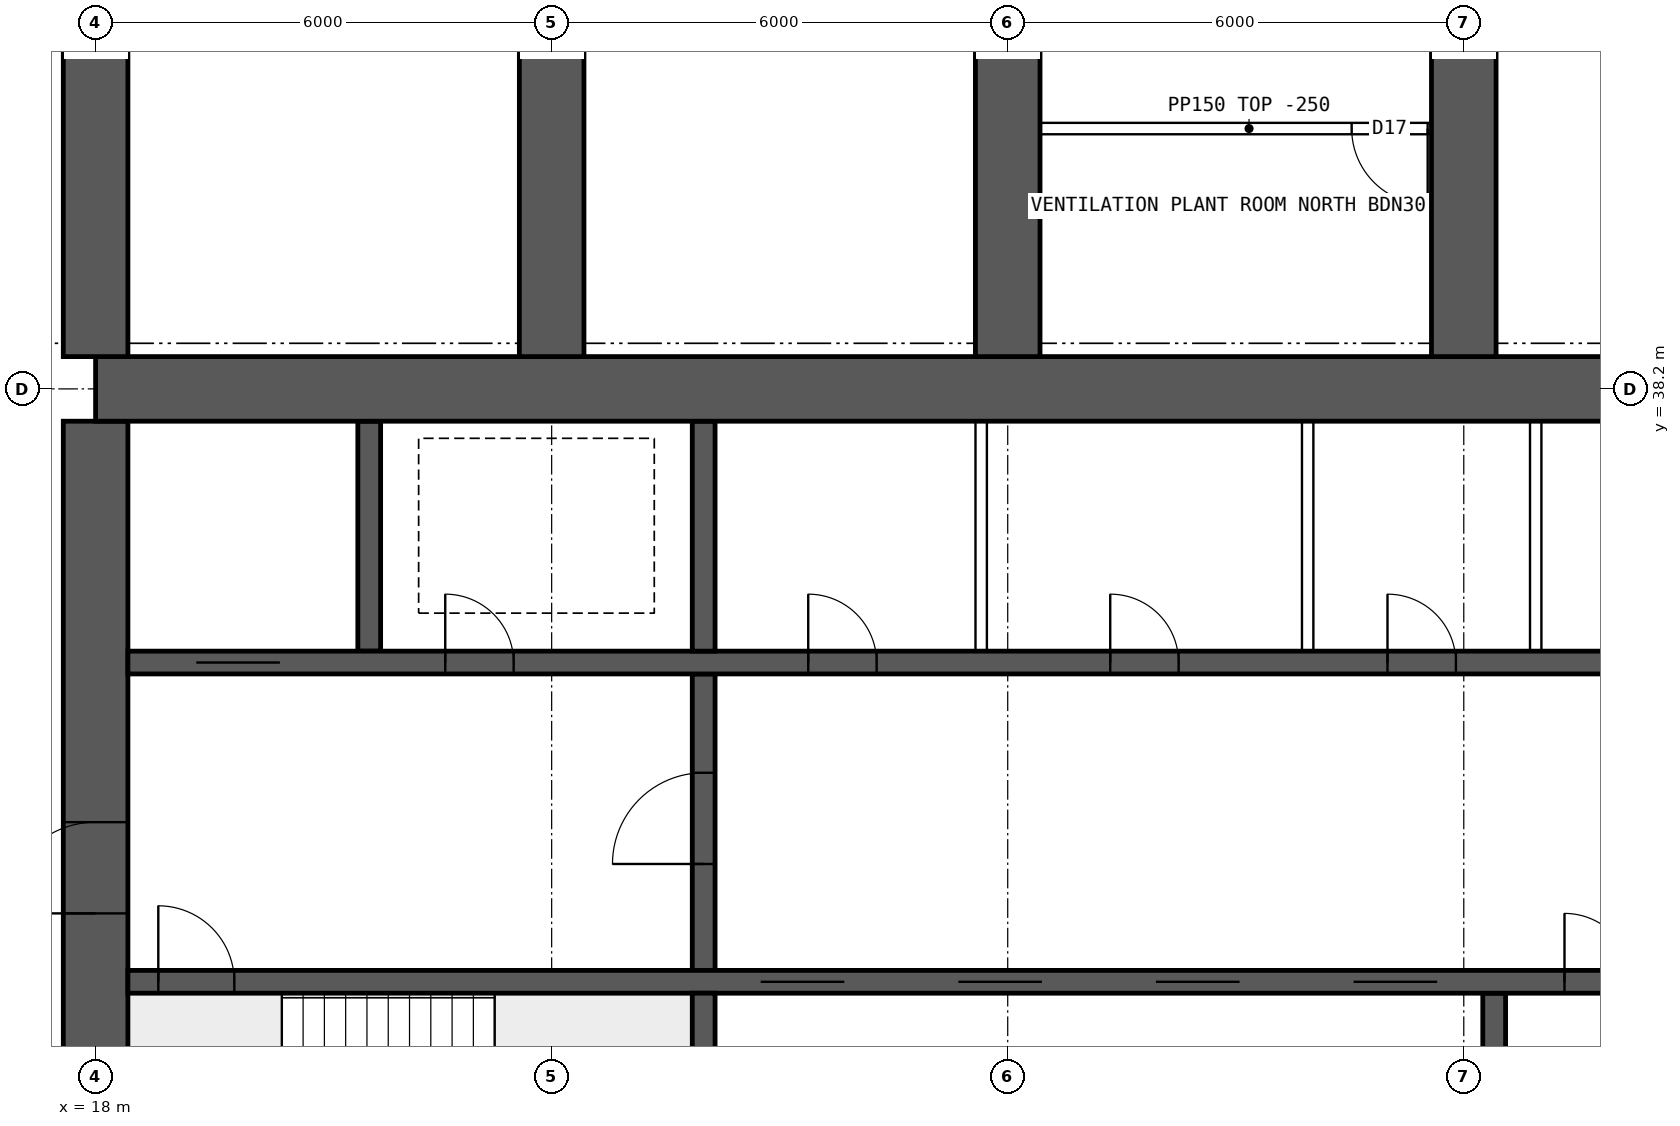
"""IFC4 building model, lengths in metres.
Left out: names, types, materials, properties, quantities, classifications, styles, units other than length and angle.
Written with IfcOpenShell. Run it as: python <this file> out.ifc"""

import sys

from ifc_helpers import new_model, si_unit, direction, frame, frame_2d, origin, place, context, subcontext, project, spatial, rectangle, extrude, element, fill, save


model = new_model("IFC4")
c1 = context("Model", 3, precision=1e-05, world=origin(), true_north=direction((0.0, 1.0)))
c2 = subcontext(c1, "Body", "Model", "MODEL_VIEW")
j1 = project(units=[si_unit("LENGTHUNIT", "METRE"), si_unit("PLANEANGLEUNIT", "RADIAN")], contexts=[c1])
p1 = place(None, origin())
s1 = spatial("IfcSite", under=j1, at=p1, CompositionType="ELEMENT")
p2 = place(p1, origin())
s2 = spatial("IfcBuilding", under=s1, at=p2, CompositionType="ELEMENT")
p3 = place(p2, frame((0.0, 0.0, 156.1)))
s3 = spatial("IfcBuildingStorey", under=s2, at=p3, CompositionType="ELEMENT", Elevation=156.1)
p4 = place(p3, frame((18.0, 38.2, 0.0), z_axis=(0.0, 0.0, 1.0), x_axis=(1.0, 0.0, 0.0)))
e1 = element("IfcWall", 1, at=p4, inside=s3, PredefinedType="SHEAR", context=c2, shape_type="SweptSolid", body=[
    extrude(rectangle(XDim=48.0, YDim=0.85, at=frame_2d((24.0, 0.0))), origin(), (0.0, 0.0, 1.0), 3.75),
])
p5 = place(p3, frame((18.0, 26.225, 0.0), z_axis=(0.0, 0.0, 1.0), x_axis=(0.0, 1.0, 0.0)))
e2 = element("IfcWall", 2, at=p5, inside=s3, PredefinedType="SHEAR", context=c2, shape_type="SweptSolid", body=[
    extrude(rectangle(XDim=11.55, YDim=0.85, at=frame_2d((5.775, 0.0))), origin(), (0.0, 0.0, 1.0), 3.75),
])
p6 = place(p5, frame((5.075, 0.0, 0.0)))
e3 = element("IfcOpeningElement", 3, at=p6, cuts=e2, PredefinedType="OPENING", context=c2, shape_type="SweptSolid", body=[
    extrude(rectangle(XDim=1.2, YDim=2.1, at=frame_2d((0.6, 1.05))), frame((0.0, 0.435, 0.0), z_axis=(0.0, -1.0, 0.0), x_axis=(1.0, 0.0, 0.0)), (0.0, 0.0, 1.0), 0.87),
])
p7 = place(p3, frame((18.425, 30.4, 0.0), z_axis=(0.0, 0.0, 1.0), x_axis=(1.0, 0.0, 0.0)))
e4 = element("IfcWall", 4, at=p7, inside=s3, PredefinedType="SHEAR", context=c2, shape_type="SweptSolid", body=[
    extrude(rectangle(XDim=47.15, YDim=0.3, at=frame_2d((23.575, 0.0))), origin(), (0.0, 0.0, 1.0), 3.75),
])
p8 = place(p7, frame((0.4, 0.0, 0.0)))
e5 = element("IfcOpeningElement", 5, at=p8, cuts=e4, PredefinedType="OPENING", context=c2, shape_type="SweptSolid", body=[
    extrude(rectangle(XDim=1.0, YDim=2.1, at=frame_2d((0.5, 1.05))), frame((0.0, 0.16, 0.0), z_axis=(0.0, -1.0, 0.0), x_axis=(1.0, 0.0, 0.0)), (0.0, 0.0, 1.0), 0.32),
])
p9 = place(p7, frame((45.75, 0.0, 0.0)))
e6 = element("IfcOpeningElement", 6, at=p9, cuts=e4, PredefinedType="OPENING", context=c2, shape_type="SweptSolid", body=[
    extrude(rectangle(XDim=1.0, YDim=2.1, at=frame_2d((0.5, 1.05))), frame((0.0, 0.16, 0.0), z_axis=(0.0, -1.0, 0.0), x_axis=(1.0, 0.0, 0.0)), (0.0, 0.0, 1.0), 0.32),
])
p10 = place(p7, frame((8.325, 0.0, 0.0)))
e7 = element("IfcOpeningElement", 7, at=p10, cuts=e4, PredefinedType="OPENING", context=c2, shape_type="SweptSolid", body=[
    extrude(rectangle(XDim=1.1, YDim=2.1, at=frame_2d((0.55, 1.05))), frame((0.0, 0.16, 0.0), z_axis=(0.0, -1.0, 0.0), x_axis=(1.0, 0.0, 0.0)), (0.0, 0.0, 1.0), 0.32),
])
p11 = place(p7, frame((10.925, 0.0, 0.0)))
e8 = element("IfcOpeningElement", 8, at=p11, cuts=e4, PredefinedType="OPENING", context=c2, shape_type="SweptSolid", body=[
    extrude(rectangle(XDim=1.1, YDim=2.1, at=frame_2d((0.55, 1.05))), frame((0.0, 0.16, 0.0), z_axis=(0.0, -1.0, 0.0), x_axis=(1.0, 0.0, 0.0)), (0.0, 0.0, 1.0), 0.32),
])
p12 = place(p7, frame((13.525, 0.0, 0.0)))
e9 = element("IfcOpeningElement", 9, at=p12, cuts=e4, PredefinedType="OPENING", context=c2, shape_type="SweptSolid", body=[
    extrude(rectangle(XDim=1.1, YDim=2.1, at=frame_2d((0.55, 1.05))), frame((0.0, 0.16, 0.0), z_axis=(0.0, -1.0, 0.0), x_axis=(1.0, 0.0, 0.0)), (0.0, 0.0, 1.0), 0.32),
])
p13 = place(p7, frame((16.125, 0.0, 0.0)))
e10 = element("IfcOpeningElement", 10, at=p13, cuts=e4, PredefinedType="OPENING", context=c2, shape_type="SweptSolid", body=[
    extrude(rectangle(XDim=1.1, YDim=2.1, at=frame_2d((0.55, 1.05))), frame((0.0, 0.16, 0.0), z_axis=(0.0, -1.0, 0.0), x_axis=(1.0, 0.0, 0.0)), (0.0, 0.0, 1.0), 0.32),
])
p14 = place(p7, frame((18.9, 0.0, 0.0)))
e11 = element("IfcOpeningElement", 11, at=p14, cuts=e4, PredefinedType="OPENING", context=c2, shape_type="SweptSolid", body=[
    extrude(rectangle(XDim=0.9, YDim=2.1, at=frame_2d((0.45, 1.05))), frame((0.0, 0.16, 0.0), z_axis=(0.0, -1.0, 0.0), x_axis=(1.0, 0.0, 0.0)), (0.0, 0.0, 1.0), 0.32),
])
p15 = place(p7, frame((30.192, 0.0, 0.0)))
e12 = element("IfcOpeningElement", 12, at=p15, cuts=e4, PredefinedType="OPENING", context=c2, shape_type="SweptSolid", body=[
    extrude(rectangle(XDim=1.1, YDim=2.1, at=frame_2d((0.55, 1.05))), frame((0.0, 0.16, 0.0), z_axis=(0.0, -1.0, 0.0), x_axis=(1.0, 0.0, 0.0)), (0.0, 0.0, 1.0), 0.32),
])
p16 = place(p7, frame((33.725, 0.0, 0.0)))
e13 = element("IfcOpeningElement", 13, at=p16, cuts=e4, PredefinedType="OPENING", context=c2, shape_type="SweptSolid", body=[
    extrude(rectangle(XDim=1.1, YDim=2.1, at=frame_2d((0.55, 1.05))), frame((0.0, 0.16, 0.0), z_axis=(0.0, -1.0, 0.0), x_axis=(1.0, 0.0, 0.0)), (0.0, 0.0, 1.0), 0.32),
])
p17 = place(p7, frame((37.258, 0.0, 0.0)))
e14 = element("IfcOpeningElement", 14, at=p17, cuts=e4, PredefinedType="OPENING", context=c2, shape_type="SweptSolid", body=[
    extrude(rectangle(XDim=1.1, YDim=2.1, at=frame_2d((0.55, 1.05))), frame((0.0, 0.16, 0.0), z_axis=(0.0, -1.0, 0.0), x_axis=(1.0, 0.0, 0.0)), (0.0, 0.0, 1.0), 0.32),
])
p18 = place(p3, frame((18.425, 34.6, 0.0), z_axis=(0.0, 0.0, 1.0), x_axis=(1.0, 0.0, 0.0)))
e15 = element("IfcWall", 15, at=p18, inside=s3, PredefinedType="SHEAR", context=c2, shape_type="SweptSolid", body=[
    extrude(rectangle(XDim=47.15, YDim=0.3, at=frame_2d((23.575, 0.0))), origin(), (0.0, 0.0, 1.0), 3.75),
])
p19 = place(p18, frame((0.9, 0.0, 0.0)))
e16 = element("IfcOpeningElement", 16, at=p19, cuts=e15, PredefinedType="OPENING", context=c2, shape_type="SweptSolid", body=[
    extrude(rectangle(XDim=1.1, YDim=2.1, at=frame_2d((0.55, 1.05))), frame((0.0, 0.16, 0.0), z_axis=(0.0, -1.0, 0.0), x_axis=(1.0, 0.0, 0.0)), (0.0, 0.0, 1.0), 0.32),
])
p20 = place(p18, frame((45.15, 0.0, 0.0)))
e17 = element("IfcOpeningElement", 17, at=p20, cuts=e15, PredefinedType="OPENING", context=c2, shape_type="SweptSolid", body=[
    extrude(rectangle(XDim=1.1, YDim=2.1, at=frame_2d((0.55, 1.05))), frame((0.0, 0.16, 0.0), z_axis=(0.0, -1.0, 0.0), x_axis=(1.0, 0.0, 0.0)), (0.0, 0.0, 1.0), 0.32),
])
p21 = place(p18, frame((4.175, 0.0, 0.0)))
e18 = element("IfcOpeningElement", 18, at=p21, cuts=e15, PredefinedType="OPENING", context=c2, shape_type="SweptSolid", body=[
    extrude(rectangle(XDim=0.9, YDim=2.1, at=frame_2d((0.45, 1.05))), frame((0.0, 0.16, 0.0), z_axis=(0.0, -1.0, 0.0), x_axis=(1.0, 0.0, 0.0)), (0.0, 0.0, 1.0), 0.32),
])
p22 = place(p18, frame((42.075, 0.0, 0.0)))
e19 = element("IfcOpeningElement", 19, at=p22, cuts=e15, PredefinedType="OPENING", context=c2, shape_type="SweptSolid", body=[
    extrude(rectangle(XDim=0.9, YDim=2.1, at=frame_2d((0.45, 1.05))), frame((0.0, 0.16, 0.0), z_axis=(0.0, -1.0, 0.0), x_axis=(1.0, 0.0, 0.0)), (0.0, 0.0, 1.0), 0.32),
])
p23 = place(p18, frame((8.95, 0.0, 0.0)))
e20 = element("IfcOpeningElement", 20, at=p23, cuts=e15, PredefinedType="OPENING", context=c2, shape_type="SweptSolid", body=[
    extrude(rectangle(XDim=0.9, YDim=2.1, at=frame_2d((0.45, 1.05))), frame((0.0, 0.16, 0.0), z_axis=(0.0, -1.0, 0.0), x_axis=(1.0, 0.0, 0.0)), (0.0, 0.0, 1.0), 0.32),
])
p24 = place(p18, frame((12.924, 0.0, 0.0)))
e21 = element("IfcOpeningElement", 21, at=p24, cuts=e15, PredefinedType="OPENING", context=c2, shape_type="SweptSolid", body=[
    extrude(rectangle(XDim=0.9, YDim=2.1, at=frame_2d((0.45, 1.05))), frame((0.0, 0.16, 0.0), z_axis=(0.0, -1.0, 0.0), x_axis=(1.0, 0.0, 0.0)), (0.0, 0.0, 1.0), 0.32),
])
p25 = place(p18, frame((16.571, 0.0, 0.0)))
e22 = element("IfcOpeningElement", 22, at=p25, cuts=e15, PredefinedType="OPENING", context=c2, shape_type="SweptSolid", body=[
    extrude(rectangle(XDim=0.9, YDim=2.1, at=frame_2d((0.45, 1.05))), frame((0.0, 0.16, 0.0), z_axis=(0.0, -1.0, 0.0), x_axis=(1.0, 0.0, 0.0)), (0.0, 0.0, 1.0), 0.32),
])
p26 = place(p18, frame((20.33, 0.0, 0.0)))
e23 = element("IfcOpeningElement", 23, at=p26, cuts=e15, PredefinedType="OPENING", context=c2, shape_type="SweptSolid", body=[
    extrude(rectangle(XDim=0.9, YDim=2.1, at=frame_2d((0.45, 1.05))), frame((0.0, 0.16, 0.0), z_axis=(0.0, -1.0, 0.0), x_axis=(1.0, 0.0, 0.0)), (0.0, 0.0, 1.0), 0.32),
])
p27 = place(p18, frame((24.736, 0.0, 0.0)))
e24 = element("IfcOpeningElement", 24, at=p27, cuts=e15, PredefinedType="OPENING", context=c2, shape_type="SweptSolid", body=[
    extrude(rectangle(XDim=0.9, YDim=2.1, at=frame_2d((0.45, 1.05))), frame((0.0, 0.16, 0.0), z_axis=(0.0, -1.0, 0.0), x_axis=(1.0, 0.0, 0.0)), (0.0, 0.0, 1.0), 0.32),
])
p28 = place(p18, frame((27.533, 0.0, 0.0)))
e25 = element("IfcOpeningElement", 25, at=p28, cuts=e15, PredefinedType="OPENING", context=c2, shape_type="SweptSolid", body=[
    extrude(rectangle(XDim=0.9, YDim=2.1, at=frame_2d((0.45, 1.05))), frame((0.0, 0.16, 0.0), z_axis=(0.0, -1.0, 0.0), x_axis=(1.0, 0.0, 0.0)), (0.0, 0.0, 1.0), 0.32),
])
p29 = place(p18, frame((29.906, 0.0, 0.0)))
e26 = element("IfcOpeningElement", 26, at=p29, cuts=e15, PredefinedType="OPENING", context=c2, shape_type="SweptSolid", body=[
    extrude(rectangle(XDim=0.9, YDim=2.1, at=frame_2d((0.45, 1.05))), frame((0.0, 0.16, 0.0), z_axis=(0.0, -1.0, 0.0), x_axis=(1.0, 0.0, 0.0)), (0.0, 0.0, 1.0), 0.32),
])
p30 = place(p18, frame((35.376, 0.0, 0.0)))
e27 = element("IfcOpeningElement", 27, at=p30, cuts=e15, PredefinedType="OPENING", context=c2, shape_type="SweptSolid", body=[
    extrude(rectangle(XDim=0.9, YDim=2.1, at=frame_2d((0.45, 1.05))), frame((0.0, 0.16, 0.0), z_axis=(0.0, -1.0, 0.0), x_axis=(1.0, 0.0, 0.0)), (0.0, 0.0, 1.0), 0.32),
])
p31 = place(p3, frame((26.0, 26.225, 0.0), z_axis=(0.0, 0.0, 1.0), x_axis=(0.0, 1.0, 0.0)))
e28 = element("IfcWall", 28, at=p31, inside=s3, PredefinedType="SHEAR", context=c2, shape_type="SweptSolid", body=[
    extrude(rectangle(XDim=4.025, YDim=0.3, at=frame_2d((2.012, 0.0))), origin(), (0.0, 0.0, 1.0), 3.75),
])
p32 = place(p3, frame((26.0, 30.55, 0.0), z_axis=(0.0, 0.0, 1.0), x_axis=(0.0, 1.0, 0.0)))
e29 = element("IfcWall", 29, at=p32, inside=s3, PredefinedType="SHEAR", context=c2, shape_type="SweptSolid", body=[
    extrude(rectangle(XDim=3.9, YDim=0.3, at=frame_2d((1.95, 0.0))), origin(), (0.0, 0.0, 1.0), 3.75),
])
p33 = place(p32, frame((1.4, 0.0, 0.0)))
e30 = element("IfcOpeningElement", 30, at=p33, cuts=e29, PredefinedType="OPENING", context=c2, shape_type="SweptSolid", body=[
    extrude(rectangle(XDim=1.2, YDim=2.1, at=frame_2d((0.6, 1.05))), frame((0.0, 0.16, 0.0), z_axis=(0.0, -1.0, 0.0), x_axis=(1.0, 0.0, 0.0)), (0.0, 0.0, 1.0), 0.32),
])
for number, where, z_axis, x_axis in (
    (31, (21.6, 34.75, 0.0), (0.0, 0.0, 1.0), (0.0, 1.0, 0.0)),
    (32, (26.0, 34.75, 0.0), (0.0, 0.0, 1.0), (0.0, 1.0, 0.0)),
):
    element("IfcWall", number, at=place(p3, frame(where, z_axis=z_axis, x_axis=x_axis)), inside=s3, PredefinedType="SHEAR", context=c2, shape_type="SweptSolid", body=[
        extrude(rectangle(XDim=3.025, YDim=0.3, at=frame_2d((1.512, 0.0))), origin(), (0.0, 0.0, 1.0), 3.75),
    ])
p34 = place(p3, frame((36.4, 26.225, 0.0), z_axis=(0.0, 0.0, 1.0), x_axis=(0.0, 1.0, 0.0)))
e33 = element("IfcWall", 33, at=p34, inside=s3, PredefinedType="SHEAR", context=c2, shape_type="SweptSolid", body=[
    extrude(rectangle(XDim=4.025, YDim=0.3, at=frame_2d((2.012, 0.0))), origin(), (0.0, 0.0, 1.0), 3.75),
])
for number, where, z_axis, x_axis in (
    (34, (18.0, 38.625, 0.0), (0.0, 0.0, 1.0), (0.0, 1.0, 0.0)),
    (35, (24.0, 38.625, 0.0), (0.0, 0.0, 1.0), (0.0, 1.0, 0.0)),
    (36, (30.0, 38.625, 0.0), (0.0, 0.0, 1.0), (0.0, 1.0, 0.0)),
    (37, (36.0, 38.625, 0.0), (0.0, 0.0, 1.0), (0.0, 1.0, 0.0)),
):
    element("IfcWall", number, at=place(p3, frame(where, z_axis=z_axis, x_axis=x_axis)), inside=s3, PredefinedType="SHEAR", context=c2, shape_type="SweptSolid", body=[
        extrude(rectangle(XDim=8.175, YDim=0.85, at=frame_2d((4.087, 0.0))), origin(), (0.0, 0.0, 1.0), 3.75),
    ])
for number, where, z_axis, x_axis in (
    (38, (29.651, 34.75, 0.0), (0.0, 0.0, 1.0), (0.0, 1.0, 0.0)),
    (39, (33.946, 34.75, 0.0), (0.0, 0.0, 1.0), (0.0, 1.0, 0.0)),
    (40, (36.946, 34.75, 0.0), (0.0, 0.0, 1.0), (0.0, 1.0, 0.0)),
):
    element("IfcWall", number, at=place(p3, frame(where, z_axis=z_axis, x_axis=x_axis)), inside=s3, PredefinedType="SOLIDWALL", context=c2, shape_type="SweptSolid", body=[
        extrude(rectangle(XDim=3.025, YDim=0.15, at=frame_2d((1.512, 0.0))), origin(), (0.0, 0.0, 1.0), 3.5),
    ])
p35 = place(p3, frame((35.925, 41.625, 0.0), z_axis=(0.0, 0.0, 1.0), x_axis=(-1.0, 0.0, 0.0)))
e41 = element("IfcWall", 41, at=p35, inside=s3, PredefinedType="PARTITIONING", context=c2, shape_type="SweptSolid", body=[
    extrude(rectangle(XDim=5.5, YDim=0.15, at=frame_2d((2.75, 0.0))), origin(), (0.0, 0.0, 1.0), 3.5),
])
p36 = place(p35, frame((0.4, 0.0, 0.0)))
e42 = element("IfcOpeningElement", 42, at=p36, cuts=e41, PredefinedType="OPENING", context=c2, shape_type="SweptSolid", body=[
    extrude(rectangle(XDim=1.0, YDim=2.1, at=frame_2d((0.5, 1.05))), frame((0.0, 0.085, 0.0), z_axis=(0.0, -1.0, 0.0), x_axis=(1.0, 0.0, 0.0)), (0.0, 0.0, 1.0), 0.17),
])
p37 = place(p6, origin())
e43 = element("IfcDoor", 43, at=p37, inside=s3, OperationType="SINGLE_SWING_LEFT", PredefinedType="DOOR", context=c2, shape_type="SweptSolid", body=[
    extrude(rectangle(XDim=1.2, YDim=2.1, at=frame_2d((0.6, 1.05))), frame((0.0, 0.025, 0.0), z_axis=(0.0, -1.0, 0.0), x_axis=(1.0, 0.0, 0.0)), (0.0, 0.0, 1.0), 0.05),
])
fill(e3, e43)
p38 = place(p8, origin())
e44 = element("IfcDoor", 44, at=p38, inside=s3, OperationType="SINGLE_SWING_LEFT", PredefinedType="DOOR", context=c2, shape_type="SweptSolid", body=[
    extrude(rectangle(XDim=1.0, YDim=2.1, at=frame_2d((0.5, 1.05))), frame((0.0, 0.025, 0.0), z_axis=(0.0, -1.0, 0.0), x_axis=(1.0, 0.0, 0.0)), (0.0, 0.0, 1.0), 0.05),
])
fill(e5, e44)
p39 = place(p19, origin())
e45 = element("IfcDoor", 45, at=p39, inside=s3, OperationType="DOUBLE_DOOR_SLIDING", PredefinedType="DOOR", context=c2, shape_type="SweptSolid", body=[
    extrude(rectangle(XDim=1.1, YDim=2.1, at=frame_2d((0.55, 1.05))), frame((0.0, 0.025, 0.0), z_axis=(0.0, -1.0, 0.0), x_axis=(1.0, 0.0, 0.0)), (0.0, 0.0, 1.0), 0.05),
])
fill(e16, e45)
p40 = place(p21, origin())
e46 = element("IfcDoor", 46, at=p40, inside=s3, OperationType="SINGLE_SWING_LEFT", PredefinedType="DOOR", context=c2, shape_type="SweptSolid", body=[
    extrude(rectangle(XDim=0.9, YDim=2.1, at=frame_2d((0.45, 1.05))), frame((0.0, 0.025, 0.0), z_axis=(0.0, -1.0, 0.0), x_axis=(1.0, 0.0, 0.0)), (0.0, 0.0, 1.0), 0.05),
])
fill(e18, e46)
p41 = place(p33, origin())
e47 = element("IfcDoor", 47, at=p41, inside=s3, OperationType="SINGLE_SWING_LEFT", PredefinedType="DOOR", context=c2, shape_type="SweptSolid", body=[
    extrude(rectangle(XDim=1.2, YDim=2.1, at=frame_2d((0.6, 1.05))), frame((0.0, 0.025, 0.0), z_axis=(0.0, -1.0, 0.0), x_axis=(1.0, 0.0, 0.0)), (0.0, 0.0, 1.0), 0.05),
])
fill(e30, e47)
p42 = place(p23, origin())
e48 = element("IfcDoor", 48, at=p42, inside=s3, OperationType="SINGLE_SWING_LEFT", PredefinedType="DOOR", context=c2, shape_type="SweptSolid", body=[
    extrude(rectangle(XDim=0.9, YDim=2.1, at=frame_2d((0.45, 1.05))), frame((0.0, 0.025, 0.0), z_axis=(0.0, -1.0, 0.0), x_axis=(1.0, 0.0, 0.0)), (0.0, 0.0, 1.0), 0.05),
])
fill(e20, e48)
p43 = place(p24, origin())
e49 = element("IfcDoor", 49, at=p43, inside=s3, OperationType="SINGLE_SWING_LEFT", PredefinedType="DOOR", context=c2, shape_type="SweptSolid", body=[
    extrude(rectangle(XDim=0.9, YDim=2.1, at=frame_2d((0.45, 1.05))), frame((0.0, 0.025, 0.0), z_axis=(0.0, -1.0, 0.0), x_axis=(1.0, 0.0, 0.0)), (0.0, 0.0, 1.0), 0.05),
])
fill(e21, e49)
p44 = place(p25, origin())
e50 = element("IfcDoor", 50, at=p44, inside=s3, OperationType="SINGLE_SWING_LEFT", PredefinedType="DOOR", context=c2, shape_type="SweptSolid", body=[
    extrude(rectangle(XDim=0.9, YDim=2.1, at=frame_2d((0.45, 1.05))), frame((0.0, 0.025, 0.0), z_axis=(0.0, -1.0, 0.0), x_axis=(1.0, 0.0, 0.0)), (0.0, 0.0, 1.0), 0.05),
])
fill(e22, e50)
p45 = place(p10, origin())
e51 = element("IfcDoor", 51, at=p45, inside=s3, OperationType="DOUBLE_DOOR_SLIDING", PredefinedType="DOOR", context=c2, shape_type="SweptSolid", body=[
    extrude(rectangle(XDim=1.1, YDim=2.1, at=frame_2d((0.55, 1.05))), frame((0.0, 0.025, 0.0), z_axis=(0.0, -1.0, 0.0), x_axis=(1.0, 0.0, 0.0)), (0.0, 0.0, 1.0), 0.05),
])
fill(e7, e51)
p46 = place(p11, origin())
e52 = element("IfcDoor", 52, at=p46, inside=s3, OperationType="DOUBLE_DOOR_SLIDING", PredefinedType="DOOR", context=c2, shape_type="SweptSolid", body=[
    extrude(rectangle(XDim=1.1, YDim=2.1, at=frame_2d((0.55, 1.05))), frame((0.0, 0.025, 0.0), z_axis=(0.0, -1.0, 0.0), x_axis=(1.0, 0.0, 0.0)), (0.0, 0.0, 1.0), 0.05),
])
fill(e8, e52)
p47 = place(p12, origin())
e53 = element("IfcDoor", 53, at=p47, inside=s3, OperationType="DOUBLE_DOOR_SLIDING", PredefinedType="DOOR", context=c2, shape_type="SweptSolid", body=[
    extrude(rectangle(XDim=1.1, YDim=2.1, at=frame_2d((0.55, 1.05))), frame((0.0, 0.025, 0.0), z_axis=(0.0, -1.0, 0.0), x_axis=(1.0, 0.0, 0.0)), (0.0, 0.0, 1.0), 0.05),
])
fill(e9, e53)
p48 = place(p13, origin())
e54 = element("IfcDoor", 54, at=p48, inside=s3, OperationType="DOUBLE_DOOR_SLIDING", PredefinedType="DOOR", context=c2, shape_type="SweptSolid", body=[
    extrude(rectangle(XDim=1.1, YDim=2.1, at=frame_2d((0.55, 1.05))), frame((0.0, 0.025, 0.0), z_axis=(0.0, -1.0, 0.0), x_axis=(1.0, 0.0, 0.0)), (0.0, 0.0, 1.0), 0.05),
])
fill(e10, e54)
p49 = place(p14, origin())
e55 = element("IfcDoor", 55, at=p49, inside=s3, OperationType="SINGLE_SWING_LEFT", PredefinedType="DOOR", context=c2, shape_type="SweptSolid", body=[
    extrude(rectangle(XDim=0.9, YDim=2.1, at=frame_2d((0.45, 1.05))), frame((0.0, 0.025, 0.0), z_axis=(0.0, -1.0, 0.0), x_axis=(1.0, 0.0, 0.0)), (0.0, 0.0, 1.0), 0.05),
])
fill(e11, e55)
p50 = place(p36, origin())
e56 = element("IfcDoor", 56, at=p50, inside=s3, OperationType="SINGLE_SWING_LEFT", PredefinedType="DOOR", context=c2, shape_type="SweptSolid", body=[
    extrude(rectangle(XDim=1.0, YDim=2.1, at=frame_2d((0.5, 1.05))), frame((0.0, 0.025, 0.0), z_axis=(0.0, -1.0, 0.0), x_axis=(1.0, 0.0, 0.0)), (0.0, 0.0, 1.0), 0.05),
])
fill(e42, e56)
save(model, sys.argv[1])
